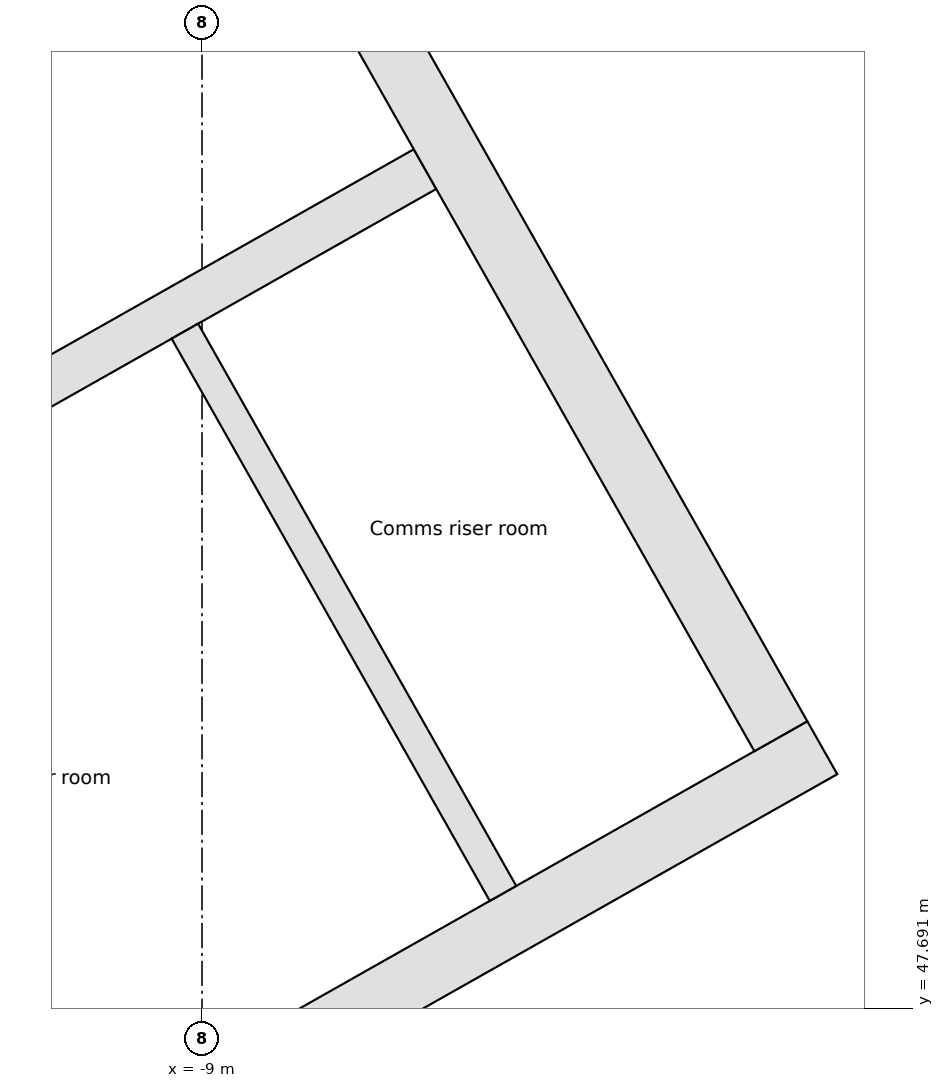
"""IFC4 building model, lengths in metres.
Left out: names, types, materials, properties, quantities, classifications, styles, units other than length and angle.
Written with IfcOpenShell. Run it as: python <this file> out.ifc"""

import sys

from ifc_helpers import new_model, si_unit, direction, frame, frame_2d, origin, place, context, subcontext, project, spatial, rectangle, extrude, element, fill, save


model = new_model("IFC4")
c1 = context("Model", 3, precision=1e-05, world=origin(), true_north=direction((0.0, 1.0)))
c2 = subcontext(c1, "Body", "Model", "MODEL_VIEW")
j1 = project(units=[si_unit("LENGTHUNIT", "METRE"), si_unit("PLANEANGLEUNIT", "RADIAN")], contexts=[c1])
p1 = place(None, origin())
s1 = spatial("IfcSite", under=j1, at=p1, CompositionType="ELEMENT")
p2 = place(p1, origin())
s2 = spatial("IfcBuilding", under=s1, at=p2, CompositionType="ELEMENT")
p3 = place(p2, frame((0.0, 0.0, 277.9)))
s3 = spatial("IfcBuildingStorey", under=s2, at=p3, CompositionType="ELEMENT", Elevation=277.9)
p4 = place(p3, frame((-58.732, 38.771, 0.0), z_axis=(0.0, 0.0, 1.0), x_axis=(0.870355615581, 0.492423702137, 0.0)))
e1 = element("IfcWall", 1, at=p4, inside=s3, PredefinedType="STANDARD", context=c2, shape_type="SweptSolid", body=[
    extrude(rectangle(XDim=64.052, YDim=0.25, at=frame_2d((32.026, 0.0))), origin(), (0.0, 0.0, 1.0), 3.52),
])
p5 = place(p4, frame((61.259, 0.0, 0.8)))
e2 = element("IfcOpeningElement", 2, at=p5, cuts=e1, PredefinedType="OPENING", context=c2, shape_type="SweptSolid", body=[
    extrude(rectangle(XDim=2.4, YDim=2.2, at=frame_2d((1.2, 1.1))), frame((0.0, 0.135, 0.0), z_axis=(0.0, -1.0, 0.0), x_axis=(1.0, 0.0, 0.0)), (0.0, 0.0, 1.0), 0.27),
])
p6 = place(p4, frame((58.216, 0.0, 0.8)))
e3 = element("IfcOpeningElement", 3, at=p6, cuts=e1, PredefinedType="OPENING", context=c2, shape_type="SweptSolid", body=[
    extrude(rectangle(XDim=2.4, YDim=2.2, at=frame_2d((1.2, 1.1))), frame((0.0, 0.135, 0.0), z_axis=(0.0, -1.0, 0.0), x_axis=(1.0, 0.0, 0.0)), (0.0, 0.0, 1.0), 0.27),
])
p7 = place(p4, frame((55.173, 0.0, 0.8)))
e4 = element("IfcOpeningElement", 4, at=p7, cuts=e1, PredefinedType="OPENING", context=c2, shape_type="SweptSolid", body=[
    extrude(rectangle(XDim=2.4, YDim=2.2, at=frame_2d((1.2, 1.1))), frame((0.0, 0.135, 0.0), z_axis=(0.0, -1.0, 0.0), x_axis=(1.0, 0.0, 0.0)), (0.0, 0.0, 1.0), 0.27),
])
p8 = place(p4, frame((52.129, 0.0, 0.8)))
e5 = element("IfcOpeningElement", 5, at=p8, cuts=e1, PredefinedType="OPENING", context=c2, shape_type="SweptSolid", body=[
    extrude(rectangle(XDim=2.4, YDim=2.2, at=frame_2d((1.2, 1.1))), frame((0.0, 0.135, 0.0), z_axis=(0.0, -1.0, 0.0), x_axis=(1.0, 0.0, 0.0)), (0.0, 0.0, 1.0), 0.27),
])
p9 = place(p4, frame((49.086, 0.0, 0.8)))
e6 = element("IfcOpeningElement", 6, at=p9, cuts=e1, PredefinedType="OPENING", context=c2, shape_type="SweptSolid", body=[
    extrude(rectangle(XDim=2.4, YDim=2.2, at=frame_2d((1.2, 1.1))), frame((0.0, 0.135, 0.0), z_axis=(0.0, -1.0, 0.0), x_axis=(1.0, 0.0, 0.0)), (0.0, 0.0, 1.0), 0.27),
])
p10 = place(p4, frame((46.043, 0.0, 0.8)))
e7 = element("IfcOpeningElement", 7, at=p10, cuts=e1, PredefinedType="OPENING", context=c2, shape_type="SweptSolid", body=[
    extrude(rectangle(XDim=2.4, YDim=2.2, at=frame_2d((1.2, 1.1))), frame((0.0, 0.135, 0.0), z_axis=(0.0, -1.0, 0.0), x_axis=(1.0, 0.0, 0.0)), (0.0, 0.0, 1.0), 0.27),
])
p11 = place(p4, frame((43.0, 0.0, 0.8)))
e8 = element("IfcOpeningElement", 8, at=p11, cuts=e1, PredefinedType="OPENING", context=c2, shape_type="SweptSolid", body=[
    extrude(rectangle(XDim=2.4, YDim=2.2, at=frame_2d((1.2, 1.1))), frame((0.0, 0.135, 0.0), z_axis=(0.0, -1.0, 0.0), x_axis=(1.0, 0.0, 0.0)), (0.0, 0.0, 1.0), 0.27),
])
p12 = place(p4, frame((39.956, 0.0, 0.8)))
e9 = element("IfcOpeningElement", 9, at=p12, cuts=e1, PredefinedType="OPENING", context=c2, shape_type="SweptSolid", body=[
    extrude(rectangle(XDim=2.4, YDim=2.2, at=frame_2d((1.2, 1.1))), frame((0.0, 0.135, 0.0), z_axis=(0.0, -1.0, 0.0), x_axis=(1.0, 0.0, 0.0)), (0.0, 0.0, 1.0), 0.27),
])
p13 = place(p4, frame((36.913, 0.0, 0.8)))
e10 = element("IfcOpeningElement", 10, at=p13, cuts=e1, PredefinedType="OPENING", context=c2, shape_type="SweptSolid", body=[
    extrude(rectangle(XDim=2.4, YDim=2.2, at=frame_2d((1.2, 1.1))), frame((0.0, 0.135, 0.0), z_axis=(0.0, -1.0, 0.0), x_axis=(1.0, 0.0, 0.0)), (0.0, 0.0, 1.0), 0.27),
])
p14 = place(p4, frame((33.87, 0.0, 0.8)))
e11 = element("IfcOpeningElement", 11, at=p14, cuts=e1, PredefinedType="OPENING", context=c2, shape_type="SweptSolid", body=[
    extrude(rectangle(XDim=2.4, YDim=2.2, at=frame_2d((1.2, 1.1))), frame((0.0, 0.135, 0.0), z_axis=(0.0, -1.0, 0.0), x_axis=(1.0, 0.0, 0.0)), (0.0, 0.0, 1.0), 0.27),
])
p15 = place(p4, frame((30.826, 0.0, 0.8)))
e12 = element("IfcOpeningElement", 12, at=p15, cuts=e1, PredefinedType="OPENING", context=c2, shape_type="SweptSolid", body=[
    extrude(rectangle(XDim=2.4, YDim=2.2, at=frame_2d((1.2, 1.1))), frame((0.0, 0.135, 0.0), z_axis=(0.0, -1.0, 0.0), x_axis=(1.0, 0.0, 0.0)), (0.0, 0.0, 1.0), 0.27),
])
p16 = place(p4, frame((27.783, 0.0, 0.8)))
e13 = element("IfcOpeningElement", 13, at=p16, cuts=e1, PredefinedType="OPENING", context=c2, shape_type="SweptSolid", body=[
    extrude(rectangle(XDim=2.4, YDim=2.2, at=frame_2d((1.2, 1.1))), frame((0.0, 0.135, 0.0), z_axis=(0.0, -1.0, 0.0), x_axis=(1.0, 0.0, 0.0)), (0.0, 0.0, 1.0), 0.27),
])
p17 = place(p4, frame((24.74, 0.0, 0.8)))
e14 = element("IfcOpeningElement", 14, at=p17, cuts=e1, PredefinedType="OPENING", context=c2, shape_type="SweptSolid", body=[
    extrude(rectangle(XDim=2.4, YDim=2.2, at=frame_2d((1.2, 1.1))), frame((0.0, 0.135, 0.0), z_axis=(0.0, -1.0, 0.0), x_axis=(1.0, 0.0, 0.0)), (0.0, 0.0, 1.0), 0.27),
])
p18 = place(p4, frame((21.696, 0.0, 0.8)))
e15 = element("IfcOpeningElement", 15, at=p18, cuts=e1, PredefinedType="OPENING", context=c2, shape_type="SweptSolid", body=[
    extrude(rectangle(XDim=2.4, YDim=2.2, at=frame_2d((1.2, 1.1))), frame((0.0, 0.135, 0.0), z_axis=(0.0, -1.0, 0.0), x_axis=(1.0, 0.0, 0.0)), (0.0, 0.0, 1.0), 0.27),
])
p19 = place(p4, frame((18.653, 0.0, 0.8)))
e16 = element("IfcOpeningElement", 16, at=p19, cuts=e1, PredefinedType="OPENING", context=c2, shape_type="SweptSolid", body=[
    extrude(rectangle(XDim=2.4, YDim=2.2, at=frame_2d((1.2, 1.1))), frame((0.0, 0.135, 0.0), z_axis=(0.0, -1.0, 0.0), x_axis=(1.0, 0.0, 0.0)), (0.0, 0.0, 1.0), 0.27),
])
p20 = place(p4, frame((15.61, 0.0, 0.8)))
e17 = element("IfcOpeningElement", 17, at=p20, cuts=e1, PredefinedType="OPENING", context=c2, shape_type="SweptSolid", body=[
    extrude(rectangle(XDim=2.4, YDim=2.2, at=frame_2d((1.2, 1.1))), frame((0.0, 0.135, 0.0), z_axis=(0.0, -1.0, 0.0), x_axis=(1.0, 0.0, 0.0)), (0.0, 0.0, 1.0), 0.27),
])
p21 = place(p4, frame((12.567, 0.0, 0.8)))
e18 = element("IfcOpeningElement", 18, at=p21, cuts=e1, PredefinedType="OPENING", context=c2, shape_type="SweptSolid", body=[
    extrude(rectangle(XDim=2.4, YDim=2.2, at=frame_2d((1.2, 1.1))), frame((0.0, 0.135, 0.0), z_axis=(0.0, -1.0, 0.0), x_axis=(1.0, 0.0, 0.0)), (0.0, 0.0, 1.0), 0.27),
])
p22 = place(p4, frame((9.523, 0.0, 0.8)))
e19 = element("IfcOpeningElement", 19, at=p22, cuts=e1, PredefinedType="OPENING", context=c2, shape_type="SweptSolid", body=[
    extrude(rectangle(XDim=2.4, YDim=2.2, at=frame_2d((1.2, 1.1))), frame((0.0, 0.135, 0.0), z_axis=(0.0, -1.0, 0.0), x_axis=(1.0, 0.0, 0.0)), (0.0, 0.0, 1.0), 0.27),
])
p23 = place(p4, frame((6.48, 0.0, 0.8)))
e20 = element("IfcOpeningElement", 20, at=p23, cuts=e1, PredefinedType="OPENING", context=c2, shape_type="SweptSolid", body=[
    extrude(rectangle(XDim=2.4, YDim=2.2, at=frame_2d((1.2, 1.1))), frame((0.0, 0.135, 0.0), z_axis=(0.0, -1.0, 0.0), x_axis=(1.0, 0.0, 0.0)), (0.0, 0.0, 1.0), 0.27),
])
p24 = place(p4, frame((3.437, 0.0, 0.8)))
e21 = element("IfcOpeningElement", 21, at=p24, cuts=e1, PredefinedType="OPENING", context=c2, shape_type="SweptSolid", body=[
    extrude(rectangle(XDim=2.4, YDim=2.2, at=frame_2d((1.2, 1.1))), frame((0.0, 0.135, 0.0), z_axis=(0.0, -1.0, 0.0), x_axis=(1.0, 0.0, 0.0)), (0.0, 0.0, 1.0), 0.27),
])
p25 = place(p4, frame((0.393, 0.0, 0.8)))
e22 = element("IfcOpeningElement", 22, at=p25, cuts=e1, PredefinedType="OPENING", context=c2, shape_type="SweptSolid", body=[
    extrude(rectangle(XDim=2.4, YDim=2.2, at=frame_2d((1.2, 1.1))), frame((0.0, 0.135, 0.0), z_axis=(0.0, -1.0, 0.0), x_axis=(1.0, 0.0, 0.0)), (0.0, 0.0, 1.0), 0.27),
])
p26 = place(p3, frame((-17.975, 42.017, 0.0), z_axis=(0.0, 0.0, 1.0), x_axis=(0.87034965173, 0.492434243055, 0.0)))
e23 = element("IfcWall", 23, at=p26, inside=s3, PredefinedType="SOLIDWALL", context=c2, shape_type="SweptSolid", body=[
    extrude(rectangle(XDim=15.0, YDim=0.4, at=frame_2d((7.5, 0.0))), origin(), (0.0, 0.0, 1.0), 3.52),
])
p27 = place(p26, frame((6.1, 0.0, 0.0)))
e24 = element("IfcOpeningElement", 24, at=p27, cuts=e23, PredefinedType="OPENING", context=c2, shape_type="SweptSolid", body=[
    extrude(rectangle(XDim=1.2, YDim=2.1, at=frame_2d((0.6, 1.05))), frame((0.0, 0.21, 0.0), z_axis=(0.0, -1.0, 0.0), x_axis=(1.0, 0.0, 0.0)), (0.0, 0.0, 1.0), 0.42),
])
p28 = place(p3, frame((-13.365, 49.911, 0.0), z_axis=(0.0, 0.0, 1.0), x_axis=(0.870347618718, 0.492437836272, 0.0)))
e25 = element("IfcWall", 25, at=p28, inside=s3, PredefinedType="SOLIDWALL", context=c2, shape_type="SweptSolid", body=[
    extrude(rectangle(XDim=6.7, YDim=0.3, at=frame_2d((3.35, 0.0))), origin(), (0.0, 0.0, 1.0), 3.52),
])
p29 = place(p28, frame((1.95, 0.0, 0.0)))
e26 = element("IfcOpeningElement", 26, at=p29, cuts=e25, PredefinedType="OPENING", context=c2, shape_type="SweptSolid", body=[
    extrude(rectangle(XDim=0.9, YDim=2.1, at=frame_2d((0.45, 1.05))), frame((0.0, 0.16, 0.0), z_axis=(0.0, -1.0, 0.0), x_axis=(1.0, 0.0, 0.0)), (0.0, 0.0, 1.0), 0.32),
])
p30 = place(p28, frame((5.35, 0.0, 0.0)))
e27 = element("IfcOpeningElement", 27, at=p30, cuts=e25, PredefinedType="OPENING", context=c2, shape_type="SweptSolid", body=[
    extrude(rectangle(XDim=0.9, YDim=2.1, at=frame_2d((0.45, 1.05))), frame((0.0, 0.16, 0.0), z_axis=(0.0, -1.0, 0.0), x_axis=(1.0, 0.0, 0.0)), (0.0, 0.0, 1.0), 0.32),
])
p31 = place(p3, frame((-15.618, 53.691, 0.0), z_axis=(0.0, 0.0, 1.0), x_axis=(0.870362830851, 0.492410948978, 0.0)))
e28 = element("IfcWall", 28, at=p31, inside=s3, PredefinedType="SOLIDWALL", context=c2, shape_type="SweptSolid", body=[
    extrude(rectangle(XDim=6.8, YDim=0.3, at=frame_2d((3.4, 0.0))), origin(), (0.0, 0.0, 1.0), 3.52),
])
p32 = place(p31, frame((3.0, 0.0, 0.0)))
e29 = element("IfcOpeningElement", 29, at=p32, cuts=e28, PredefinedType="OPENING", context=c2, shape_type="SweptSolid", body=[
    extrude(rectangle(XDim=0.9, YDim=2.1, at=frame_2d((0.45, 1.05))), frame((0.0, 0.16, 0.0), z_axis=(0.0, -1.0, 0.0), x_axis=(1.0, 0.0, 0.0)), (0.0, 0.0, 1.0), 0.32),
])
p33 = place(p3, frame((-9.113, 52.144, 0.0), z_axis=(0.0, 0.0, 1.0), x_axis=(0.492422543467, -0.870356271124, 0.0)))
e30 = element("IfcWall", 30, at=p33, inside=s3, PredefinedType="PARTITIONING", context=c2, shape_type="SweptSolid", body=[
    extrude(rectangle(XDim=4.25, YDim=0.2, at=frame_2d((2.125, 0.0))), origin(), (0.0, 0.0, 1.0), 3.52),
])
p34 = place(p3, frame((-11.692, 60.968, 0.0), z_axis=(0.0, 0.0, 1.0), x_axis=(0.492421663121, -0.870356769198, 0.0)))
e31 = element("IfcWall", 31, at=p34, inside=s3, PredefinedType="SOLIDWALL", context=c2, shape_type="SweptSolid", body=[
    extrude(rectangle(XDim=13.2, YDim=0.4, at=frame_2d((6.6, 0.0))), origin(), (0.0, 0.0, 1.0), 3.52),
])
p35 = place(p3, frame((-5.806, 50.97, 0.0), z_axis=(0.0, 0.0, 1.0), x_axis=(0.870355163327, 0.492424501492, 0.0)))
e32 = element("IfcWall", 32, at=p35, inside=s3, PredefinedType="PARTITIONING", context=c2, shape_type="SweptSolid", body=[
    extrude(rectangle(XDim=6.527, YDim=0.125, at=frame_2d((3.264, 0.0))), origin(), (0.0, 0.0, 1.0), 2.8),
])
p36 = place(p35, frame((2.45, 0.0, 0.0)))
e33 = element("IfcOpeningElement", 33, at=p36, cuts=e32, PredefinedType="OPENING", context=c2, shape_type="SweptSolid", body=[
    extrude(rectangle(XDim=1.8, YDim=2.1, at=frame_2d((0.9, 1.05))), frame((0.0, 0.073, 0.0), z_axis=(0.0, -1.0, 0.0), x_axis=(1.0, 0.0, 0.0)), (0.0, 0.0, 1.0), 0.145),
])
p37 = place(p30, frame((0.9, 0.0, 0.0), z_axis=(0.0, 0.0, 1.0), x_axis=(-1.0, 0.0, 0.0)))
e34 = element("IfcDoor", 34, at=p37, inside=s3, OperationType="SINGLE_SWING_LEFT", PredefinedType="DOOR", context=c2, shape_type="SweptSolid", body=[
    extrude(rectangle(XDim=0.9, YDim=2.1, at=frame_2d((0.45, 1.05))), frame((0.0, 0.025, 0.0), z_axis=(0.0, -1.0, 0.0), x_axis=(1.0, 0.0, 0.0)), (0.0, 0.0, 1.0), 0.05),
])
fill(e27, e34)
save(model, sys.argv[1])
